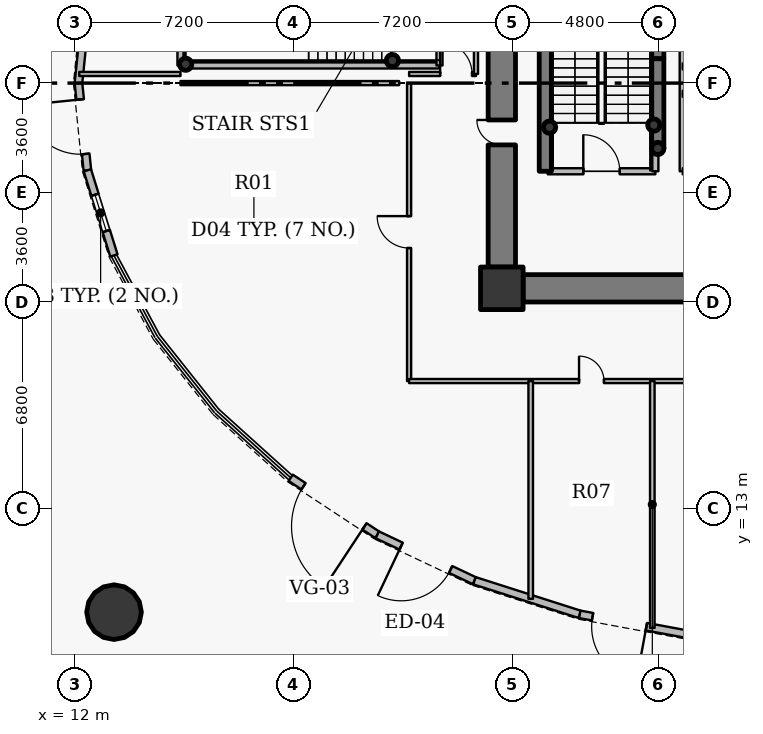
"""IFC4 building model, lengths in metres.
Left out: names, types, materials, properties, quantities, classifications, styles, units other than length and angle.
Written with IfcOpenShell. Run it as: python <this file> out.ifc"""

import sys

from ifc_helpers import new_model, si_unit, direction, frame, frame_2d, origin, origin_2d, place, context, subcontext, project, spatial, rectangle, hollow_circle, extrude, source, transform, mapped, element, fill, save


model = new_model("IFC4")
c1 = context("Model", 3, precision=1e-05, world=origin(), true_north=direction((0.0, 1.0)))
c2 = subcontext(c1, "Body", "Model", "MODEL_VIEW")
j1 = project(units=[si_unit("LENGTHUNIT", "METRE"), si_unit("PLANEANGLEUNIT", "RADIAN")], contexts=[c1])
p1 = place(None, origin())
s1 = spatial("IfcSite", under=j1, at=p1, CompositionType="ELEMENT")
p2 = place(p1, origin())
s2 = spatial("IfcBuilding", under=s1, at=p2, CompositionType="ELEMENT")
p3 = place(p2, origin())
s3 = spatial("IfcBuildingStorey", under=s2, at=p3, CompositionType="ELEMENT", Elevation=0.0)
p4 = place(p3, frame((26.05, 20.25, 0.0), z_axis=(0.0, 0.0, 1.0), x_axis=(1.0, 0.0, 0.0)))
e1 = element("IfcColumn", 1, at=p4, inside=s3, PredefinedType="COLUMN", context=c2, shape_type="SweptSolid", body=[
    extrude(rectangle(XDim=1.4, YDim=1.4, at=origin_2d()), origin(), (0.0, 0.0, 1.0), 6.0),
])
p5 = place(p3, frame((27.48, 24.1, 0.0), z_axis=(0.0, 0.0, 1.0), x_axis=(0.0, 1.0, 0.0)))
e2 = element("IfcWall", 2, at=p5, inside=s3, PredefinedType="SHEAR", context=c2, shape_type="SweptSolid", body=[
    extrude(rectangle(XDim=8.6, YDim=0.4, at=frame_2d((4.3, 0.0))), origin(), (0.0, 0.0, 1.0), 6.0),
])
p6 = place(p3, frame((31.18, 27.8, 0.0), z_axis=(0.0, 0.0, 1.0), x_axis=(0.0, 1.0, 0.0)))
e3 = element("IfcWall", 3, at=p6, inside=s3, PredefinedType="SHEAR", context=c2, shape_type="SweptSolid", body=[
    extrude(rectangle(XDim=4.9, YDim=0.4, at=frame_2d((2.45, 0.0))), origin(), (0.0, 0.0, 1.0), 6.0),
])
for number, where, z_axis, x_axis in (
    (4, (31.05, 25.62, 0.0), (0.0, 0.0, 1.0), (1.0, 0.0, 0.0)),
    (5, (31.18, 24.85, 0.0), (0.0, 0.0, 1.0), (1.0, 0.0, 0.0)),
    (6, (27.62, 25.55, 0.0), (0.0, 0.0, 1.0), (1.0, 0.0, 0.0)),
    (7, (15.65, 27.62, 0.0), (0.0, 0.0, 1.0), (1.0, 0.0, 0.0)),
    (8, (22.45, 27.74, 0.0), (0.0, 0.0, 1.0), (1.0, 0.0, 0.0)),
):
    element("IfcColumn", number, at=place(p3, frame(where, z_axis=z_axis, x_axis=x_axis)), inside=s3, PredefinedType="COLUMN", context=c2, shape_type="SweptSolid", body=[
        extrude(hollow_circle(Radius=0.203, WallThickness=0.016, at=origin_2d()), origin(), (0.0, 0.0, 1.0), 6.0),
    ])
p7 = place(p3, frame((45.25, 20.25, 0.0), z_axis=(0.0, 0.0, 1.0), x_axis=(-1.0, 0.0, 0.0)))
e9 = element("IfcWall", 9, at=p7, inside=s3, PredefinedType="SHEAR", context=c2, shape_type="SweptSolid", body=[
    extrude(rectangle(XDim=18.5, YDim=0.9, at=frame_2d((9.25, 0.0))), origin(), (0.0, 0.0, 1.0), 5.15),
])
p8 = place(p7, frame((10.0, 0.0, 0.0)))
e10 = element("IfcOpeningElement", 10, at=p8, cuts=e9, PredefinedType="OPENING", context=c2, shape_type="SweptSolid", body=[
    extrude(rectangle(XDim=1.15, YDim=2.15, at=origin_2d()), frame((0.575, 0.46, 1.075), z_axis=(0.0, -1.0, 0.0), x_axis=(1.0, 0.0, 0.0)), (0.0, 0.0, 1.0), 0.92),
])
p9 = place(p3, frame((26.05, 20.95, 0.0), z_axis=(0.0, 0.0, 1.0), x_axis=(0.0, 1.0, 0.0)))
e11 = element("IfcWall", 11, at=p9, inside=s3, PredefinedType="SHEAR", context=c2, shape_type="SweptSolid", body=[
    extrude(rectangle(XDim=12.1, YDim=0.9, at=frame_2d((6.05, 0.0))), origin(), (0.0, 0.0, 1.0), 5.15),
])
p10 = place(p9, frame((4.017, 0.0, 0.0)))
e12 = element("IfcOpeningElement", 12, at=p10, cuts=e11, PredefinedType="OPENING", context=c2, shape_type="SweptSolid", body=[
    extrude(rectangle(XDim=0.82, YDim=2.1, at=origin_2d()), frame((0.41, 0.46, 1.05), z_axis=(0.0, -1.0, 0.0), x_axis=(1.0, 0.0, 0.0)), (0.0, 0.0, 1.0), 0.92),
])
p11 = place(p3, frame((31.18, 24.85, 0.0), z_axis=(0.0, 0.0, 1.0), x_axis=(0.0, 1.0, 0.0)))
e13 = element("IfcWall", 13, at=p11, inside=s3, PredefinedType="SHEAR", context=c2, shape_type="SweptSolid", body=[
    extrude(rectangle(XDim=2.95, YDim=0.4, at=frame_2d((1.475, 0.0))), origin(), (0.0, 0.0, 1.0), 5.3),
])
p12 = place(p3, frame((13.295, 9.599, 0.0), z_axis=(0.0, 0.0, 1.0), x_axis=(1.0, 0.0, 0.0)))
e14 = element("IfcColumn", 14, at=p12, inside=s3, PredefinedType="COLUMN", context=c2, shape_type="SweptSolid", body=[
    extrude(hollow_circle(Radius=0.9, WallThickness=0.05, at=origin_2d()), origin(), (0.0, 0.0, 1.0), 6.0),
])
p13 = place(p3, frame((12.125, 27.0, 0.0), z_axis=(0.0, 0.0, 1.0), x_axis=(0.10159063445, 0.994826287847, 0.0)))
e15 = element("IfcWall", 15, at=p13, inside=s3, PredefinedType="SOLIDWALL", context=c2, shape_type="SweptSolid", body=[
    extrude(rectangle(XDim=2.884, YDim=0.25, at=frame_2d((1.442, 0.0))), origin(), (0.0, 0.0, 1.0), 4.885),
])
p14 = place(p3, frame((12.418, 24.131, 0.0), z_axis=(0.0, 0.0, 1.0), x_axis=(-0.10159063445, 0.994826287847, 0.0)))
e16 = element("IfcWall", 16, at=p14, inside=s3, PredefinedType="SOLIDWALL", context=c2, shape_type="SweptSolid", body=[
    extrude(rectangle(XDim=2.884, YDim=0.25, at=frame_2d((1.442, 0.0))), origin(), (0.0, 0.0, 1.0), 4.885),
])
p15 = place(p14, frame((0.542, 0.0, 0.0)))
e17 = element("IfcOpeningElement", 17, at=p15, cuts=e16, PredefinedType="OPENING", context=c2, shape_type="SweptSolid", body=[
    extrude(rectangle(XDim=1.8, YDim=2.2, at=origin_2d()), frame((0.9, 0.135, 1.1), z_axis=(0.0, -1.0, 0.0), x_axis=(1.0, 0.0, 0.0)), (0.0, 0.0, 1.0), 0.27),
])
p16 = place(p3, frame((13.29, 21.332, 0.0), z_axis=(0.0, 0.0, 1.0), x_axis=(-0.297355038878, 0.954766977254, 0.0)))
e18 = element("IfcWall", 18, at=p16, inside=s3, PredefinedType="SOLIDWALL", context=c2, shape_type="SweptSolid", body=[
    extrude(rectangle(XDim=2.932, YDim=0.25, at=frame_2d((1.466, 0.0))), origin(), (0.0, 0.0, 1.0), 4.885),
])
p17 = place(p16, frame((0.841, 0.0, 0.9)))
e19 = element("IfcOpeningElement", 19, at=p17, cuts=e18, PredefinedType="OPENING", context=c2, shape_type="SweptSolid", body=[
    extrude(rectangle(XDim=1.25, YDim=1.65, at=origin_2d()), frame((0.625, 0.135, 0.825), z_axis=(0.0, -1.0, 0.0), x_axis=(1.0, 0.0, 0.0)), (0.0, 0.0, 1.0), 0.27),
])
p18 = place(p3, frame((21.954, 12.142, 0.0), z_axis=(0.0, 0.0, 1.0), x_axis=(-0.835263082911, 0.549850509071, 0.0)))
e20 = element("IfcWall", 20, at=p18, inside=s3, PredefinedType="SOLIDWALL", context=c2, shape_type="SweptSolid", body=[
    extrude(rectangle(XDim=3.41, YDim=0.25, at=frame_2d((1.705, 0.0))), origin(), (0.0, 0.0, 1.0), 4.885),
])
p19 = place(p18, frame((0.505, 0.0, 0.0)))
e21 = element("IfcOpeningElement", 21, at=p19, cuts=e20, PredefinedType="OPENING", context=c2, shape_type="SweptSolid", body=[
    extrude(rectangle(XDim=2.4, YDim=2.2, at=origin_2d()), frame((1.2, 0.135, 1.1), z_axis=(0.0, -1.0, 0.0), x_axis=(1.0, 0.0, 0.0)), (0.0, 0.0, 1.0), 0.27),
])
p20 = place(p3, frame((25.15, 10.633, 0.0), z_axis=(0.0, 0.0, 1.0), x_axis=(-0.9041930697, 0.427123978146, 0.0)))
e22 = element("IfcWall", 22, at=p20, inside=s3, PredefinedType="SOLIDWALL", context=c2, shape_type="SweptSolid", body=[
    extrude(rectangle(XDim=3.534, YDim=0.25, at=frame_2d((1.767, 0.0))), origin(), (0.0, 0.0, 1.0), 4.885),
])
p21 = place(p20, frame((0.867, 0.0, 0.0)))
e23 = element("IfcOpeningElement", 23, at=p21, cuts=e22, PredefinedType="OPENING", context=c2, shape_type="SweptSolid", body=[
    extrude(rectangle(XDim=1.8, YDim=2.2, at=origin_2d()), frame((0.9, 0.135, 1.1), z_axis=(0.0, -1.0, 0.0), x_axis=(1.0, 0.0, 0.0)), (0.0, 0.0, 1.0), 0.27),
])
p22 = place(p3, frame((28.614, 9.527, 0.0), z_axis=(0.0, 0.0, 1.0), x_axis=(-0.952608721119, 0.304198330777, 0.0)))
e24 = element("IfcWall", 24, at=p22, inside=s3, PredefinedType="SOLIDWALL", context=c2, shape_type="SweptSolid", body=[
    extrude(rectangle(XDim=3.636, YDim=0.25, at=frame_2d((1.818, 0.0))), origin(), (0.0, 0.0, 1.0), 4.885),
])
p23 = place(p3, frame((32.261, 8.852, 0.0), z_axis=(0.0, 0.0, 1.0), x_axis=(-0.983306878602, 0.181954891374, 0.0)))
e25 = element("IfcWall", 25, at=p23, inside=s3, PredefinedType="SOLIDWALL", context=c2, shape_type="SweptSolid", body=[
    extrude(rectangle(XDim=3.709, YDim=0.25, at=frame_2d((1.854, 0.0))), origin(), (0.0, 0.0, 1.0), 5.7),
])
p24 = place(p23, frame((1.481, 0.0, 0.0)))
e26 = element("IfcOpeningElement", 26, at=p24, cuts=e25, PredefinedType="OPENING", context=c2, shape_type="SweptSolid", body=[
    extrude(rectangle(XDim=1.8, YDim=2.2, at=origin_2d()), frame((0.9, 0.135, 1.1), z_axis=(0.0, -1.0, 0.0), x_axis=(1.0, 0.0, 0.0)), (0.0, 0.0, 1.0), 0.27),
])
p25 = place(p3, frame((15.48, 27.58, 0.0), z_axis=(0.0, 0.0, 1.0), x_axis=(0.0, 1.0, 0.0)))
e27 = element("IfcWall", 27, at=p25, inside=s3, PredefinedType="PARTITIONING", context=c2, shape_type="SweptSolid", body=[
    extrude(rectangle(XDim=3.54, YDim=0.2, at=frame_2d((1.77, 0.0))), origin(), (0.0, 0.0, 1.0), 5.7),
])
p26 = place(p3, frame((15.48, 27.58, 0.0), z_axis=(0.0, 0.0, 1.0), x_axis=(1.0, 0.0, 0.0)))
e28 = element("IfcWall", 28, at=p26, inside=s3, PredefinedType="PARTITIONING", context=c2, shape_type="SweptSolid", body=[
    extrude(rectangle(XDim=8.52, YDim=0.2, at=frame_2d((4.26, 0.0))), origin(), (0.0, 0.0, 1.0), 5.7),
])
p27 = place(p3, frame((23.0, 17.2, 0.0), z_axis=(0.0, 0.0, 1.0), x_axis=(0.0, 1.0, 0.0)))
e29 = element("IfcWall", 29, at=p27, inside=s3, PredefinedType="PARTITIONING", context=c2, shape_type="SweptSolid", body=[
    extrude(rectangle(XDim=9.8, YDim=0.135, at=frame_2d((4.9, 0.0))), origin(), (0.0, 0.0, 1.0), 4.885),
])
p28 = place(p27, frame((4.375, 0.0, 0.0)))
e30 = element("IfcOpeningElement", 30, at=p28, cuts=e29, PredefinedType="OPENING", context=c2, shape_type="SweptSolid", body=[
    extrude(rectangle(XDim=1.05, YDim=2.15, at=origin_2d()), frame((0.525, 0.078, 1.075), z_axis=(0.0, -1.0, 0.0), x_axis=(1.0, 0.0, 0.0)), (0.0, 0.0, 1.0), 0.155),
])
p29 = place(p3, frame((23.0, 17.2, 0.0), z_axis=(0.0, 0.0, 1.0), x_axis=(1.0, 0.0, 0.0)))
e31 = element("IfcWall", 31, at=p29, inside=s3, PredefinedType="PARTITIONING", context=c2, shape_type="SweptSolid", body=[
    extrude(rectangle(XDim=11.2, YDim=0.135, at=frame_2d((5.6, 0.0))), origin(), (0.0, 0.0, 1.0), 4.885),
])
p30 = place(p29, frame((5.59, 0.0, 0.0)))
e32 = element("IfcOpeningElement", 32, at=p30, cuts=e31, PredefinedType="OPENING", context=c2, shape_type="SweptSolid", body=[
    extrude(rectangle(XDim=0.82, YDim=2.1, at=origin_2d()), frame((0.41, 0.078, 1.05), z_axis=(0.0, -1.0, 0.0), x_axis=(1.0, 0.0, 0.0)), (0.0, 0.0, 1.0), 0.155),
])
p31 = place(p3, frame((23.0, 27.3, 0.0), z_axis=(0.0, 0.0, 1.0), x_axis=(1.0, 0.0, 0.0)))
e33 = element("IfcWall", 33, at=p31, inside=s3, PredefinedType="PARTITIONING", context=c2, shape_type="SweptSolid", body=[
    extrude(rectangle(XDim=2.2, YDim=0.135, at=frame_2d((1.1, 0.0))), origin(), (0.0, 0.0, 1.0), 5.7),
])
p32 = place(p31, frame((1.021, 0.0, 0.0)))
e34 = element("IfcOpeningElement", 34, at=p32, cuts=e33, PredefinedType="OPENING", context=c2, shape_type="SweptSolid", body=[
    extrude(rectangle(XDim=1.05, YDim=2.15, at=origin_2d()), frame((0.525, 0.078, 1.075), z_axis=(0.0, -1.0, 0.0), x_axis=(1.0, 0.0, 0.0)), (0.0, 0.0, 1.0), 0.155),
])
p33 = place(p3, frame((24.0, 27.58, 0.0), z_axis=(0.0, 0.0, 1.0), x_axis=(0.0, 1.0, 0.0)))
e35 = element("IfcWall", 35, at=p33, inside=s3, PredefinedType="PARTITIONING", context=c2, shape_type="SweptSolid", body=[
    extrude(rectangle(XDim=3.54, YDim=0.2, at=frame_2d((1.77, 0.0))), origin(), (0.0, 0.0, 1.0), 5.7),
])
p34 = place(p3, frame((25.2, 27.3, 0.0), z_axis=(0.0, 0.0, 1.0), x_axis=(0.0, 1.0, 0.0)))
e36 = element("IfcWall", 36, at=p34, inside=s3, PredefinedType="PARTITIONING", context=c2, shape_type="SweptSolid", body=[
    extrude(rectangle(XDim=3.9, YDim=0.135, at=frame_2d((1.95, 0.0))), origin(), (0.0, 0.0, 1.0), 4.885),
])
p35 = place(p3, frame((27.0, 10.037, 0.0), z_axis=(0.0, 0.0, 1.0), x_axis=(0.0, 1.0, 0.0)))
e37 = element("IfcWall", 37, at=p35, inside=s3, PredefinedType="PARTITIONING", context=c2, shape_type="SweptSolid", body=[
    extrude(rectangle(XDim=7.163, YDim=0.15, at=frame_2d((3.582, 0.0))), origin(), (0.0, 0.0, 1.0), 4.885),
])
p36 = place(p3, frame((27.56, 24.1, 0.0), z_axis=(0.0, 0.0, 1.0), x_axis=(1.0, 0.0, 0.0)))
e38 = element("IfcWall", 38, at=p36, inside=s3, PredefinedType="PARTITIONING", context=c2, shape_type="SweptSolid", body=[
    extrude(rectangle(XDim=3.54, YDim=0.2, at=frame_2d((1.77, 0.0))), origin(), (0.0, 0.0, 1.0), 5.7),
])
p37 = place(p36, frame((1.17, 0.0, 0.0)))
e39 = element("IfcOpeningElement", 39, at=p37, cuts=e38, PredefinedType="OPENING", context=c2, shape_type="SweptSolid", body=[
    extrude(rectangle(XDim=1.2, YDim=2.15, at=origin_2d()), frame((0.6, 0.11, 1.075), z_axis=(0.0, -1.0, 0.0), x_axis=(1.0, 0.0, 0.0)), (0.0, 0.0, 1.0), 0.22),
])
p38 = place(p3, frame((31.0, 9.08, 0.0), z_axis=(0.0, 0.0, 1.0), x_axis=(0.0, 1.0, 0.0)))
e40 = element("IfcWall", 40, at=p38, inside=s3, PredefinedType="PARTITIONING", context=c2, shape_type="SweptSolid", body=[
    extrude(rectangle(XDim=8.12, YDim=0.15, at=frame_2d((4.06, 0.0))), origin(), (0.0, 0.0, 1.0), 5.7),
])
p39 = place(p3, frame((31.1, 24.1, 0.0), z_axis=(0.0, 0.0, 1.0), x_axis=(0.0, 1.0, 0.0)))
e41 = element("IfcWall", 41, at=p39, inside=s3, PredefinedType="PARTITIONING", context=c2, shape_type="SweptSolid", body=[
    extrude(rectangle(XDim=0.74, YDim=0.2, at=frame_2d((0.37, 0.0))), origin(), (0.0, 0.0, 1.0), 5.7),
])
p40 = place(p3, frame((32.0, 24.1, 0.0), z_axis=(0.0, 0.0, 1.0), x_axis=(0.0, 1.0, 0.0)))
e42 = element("IfcWall", 42, at=p40, inside=s3, PredefinedType="PARTITIONING", context=c2, shape_type="SweptSolid", body=[
    extrude(rectangle(XDim=8.0, YDim=0.2, at=frame_2d((4.0, 0.0))), origin(), (0.0, 0.0, 1.0), 5.7),
])
p41 = place(p3, frame((15.48, 27.3, 0.0), z_axis=(0.0, 0.0, 1.0), x_axis=(-1.0, 0.0, 0.0)))
e43 = element("IfcWall", 43, at=p41, inside=s3, PredefinedType="PARTITIONING", context=c2, shape_type="SweptSolid", body=[
    extrude(rectangle(XDim=3.329, YDim=0.135, at=frame_2d((1.665, 0.0))), origin(), (0.0, 0.0, 1.0), 5.7),
])
p42 = place(p3, frame((25.6, 20.94, 0.0), z_axis=(0.0, 0.0, 1.0), x_axis=(0.0, -1.0, 0.0)))
e44 = element("IfcWall", 44, at=p42, inside=s3, PredefinedType="PARTITIONING", context=c2, shape_type="SweptSolid", body=[
    extrude(rectangle(XDim=1.14, YDim=0.135, at=frame_2d((0.57, 0.0))), origin(), (0.0, 0.0, 1.0), 5.7),
])
p43 = place(p3, frame((25.907, 19.8, 0.0), z_axis=(0.0, 0.0, 1.0), x_axis=(1.0, 0.0, 0.0)))
e45 = element("IfcWall", 45, at=p43, inside=s3, PredefinedType="PARTITIONING", context=c2, shape_type="SweptSolid", body=[
    extrude(rectangle(XDim=0.833, YDim=0.135, at=frame_2d((0.416, 0.0))), origin(), (0.0, 0.0, 1.0), 4.885),
])
p44 = place(p3, frame((15.48, 27.0, 0.0), z_axis=(0.0, 0.0, 1.0), x_axis=(1.0, 0.0, 0.0)))
e46 = element("IfcWall", 46, at=p44, inside=s3, PredefinedType="PARTITIONING", context=c2, shape_type="SweptSolid", body=[
    extrude(rectangle(XDim=7.193, YDim=0.135, at=frame_2d((3.596, 0.0))), origin(), (0.0, 0.0, 1.0), 4.885),
])
m1 = source(origin(), c2, "Body", "SweptSolid", [
    extrude(rectangle(XDim=1.8, YDim=2.2, at=origin_2d()), frame((0.9, 0.025, 1.1), z_axis=(0.0, -1.0, 0.0), x_axis=(1.0, 0.0, 0.0)), (0.0, 0.0, 1.0), 0.05),
])
p45 = place(p15, origin())
e47 = element("IfcDoor", 47, at=p45, inside=s3, OperationType="SINGLE_SWING_RIGHT", PredefinedType="DOOR", context=c2, shape_type="MappedRepresentation", body=[
    mapped(m1, transform((0.0, 0.0, 0.0), x_axis=(1.0, 0.0, 0.0), y_axis=(0.0, 1.0, 0.0), z_axis=(0.0, 0.0, 1.0), scale=1.0)),
])
fill(e17, e47)
m2 = source(origin(), c2, "Body", "SweptSolid", [
    extrude(rectangle(XDim=1.25, YDim=1.65, at=origin_2d()), frame((0.625, 0.03, 0.825), z_axis=(0.0, -1.0, 0.0), x_axis=(1.0, 0.0, 0.0)), (0.0, 0.0, 1.0), 0.06),
])
p46 = place(p17, origin())
e48 = element("IfcWindow", 48, at=p46, inside=s3, PartitioningType="SINGLE_PANEL", PredefinedType="WINDOW", context=c2, shape_type="MappedRepresentation", body=[
    mapped(m2, transform((0.0, 0.0, 0.0), x_axis=(1.0, 0.0, 0.0), y_axis=(0.0, 1.0, 0.0), z_axis=(0.0, 0.0, 1.0), scale=1.0)),
])
fill(e19, e48)
m3 = source(origin(), c2, "Body", "SweptSolid", [
    extrude(rectangle(XDim=2.4, YDim=2.2, at=origin_2d()), frame((1.2, 0.025, 1.1), z_axis=(0.0, -1.0, 0.0), x_axis=(1.0, 0.0, 0.0)), (0.0, 0.0, 1.0), 0.05),
])
p47 = place(p19, origin())
e49 = element("IfcDoor", 49, at=p47, inside=s3, OperationType="SINGLE_SWING_LEFT", PredefinedType="GATE", context=c2, shape_type="MappedRepresentation", body=[
    mapped(m3, transform((0.0, 0.0, 0.0), x_axis=(1.0, 0.0, 0.0), y_axis=(0.0, 1.0, 0.0), z_axis=(0.0, 0.0, 1.0), scale=1.0)),
])
fill(e21, e49)
p48 = place(p21, origin())
e50 = element("IfcDoor", 50, at=p48, inside=s3, OperationType="SINGLE_SWING_RIGHT", PredefinedType="DOOR", context=c2, shape_type="MappedRepresentation", body=[
    mapped(m1, transform((0.0, 0.0, 0.0), x_axis=(1.0, 0.0, 0.0), y_axis=(0.0, 1.0, 0.0), z_axis=(0.0, 0.0, 1.0), scale=1.0)),
])
fill(e23, e50)
p49 = place(p24, origin())
e51 = element("IfcDoor", 51, at=p49, inside=s3, OperationType="SINGLE_SWING_LEFT", PredefinedType="DOOR", context=c2, shape_type="MappedRepresentation", body=[
    mapped(m1, transform((0.0, 0.0, 0.0), x_axis=(1.0, 0.0, 0.0), y_axis=(0.0, 1.0, 0.0), z_axis=(0.0, 0.0, 1.0), scale=1.0)),
])
fill(e26, e51)
m4 = source(origin(), c2, "Body", "SweptSolid", [
    extrude(rectangle(XDim=0.82, YDim=2.1, at=origin_2d()), frame((0.41, 0.025, 1.05), z_axis=(0.0, -1.0, 0.0), x_axis=(1.0, 0.0, 0.0)), (0.0, 0.0, 1.0), 0.05),
])
p50 = place(p10, origin())
e52 = element("IfcDoor", 52, at=p50, inside=s3, OperationType="SINGLE_SWING_RIGHT", PredefinedType="DOOR", context=c2, shape_type="MappedRepresentation", body=[
    mapped(m4, transform((0.0, 0.0, 0.0), x_axis=(1.0, 0.0, 0.0), y_axis=(0.0, 1.0, 0.0), z_axis=(0.0, 0.0, 1.0), scale=1.0)),
])
fill(e12, e52)
m5 = source(origin(), c2, "Body", "SweptSolid", [
    extrude(rectangle(XDim=1.2, YDim=2.15, at=origin_2d()), frame((0.6, 0.025, 1.075), z_axis=(0.0, -1.0, 0.0), x_axis=(1.0, 0.0, 0.0)), (0.0, 0.0, 1.0), 0.05),
])
p51 = place(p37, origin())
e53 = element("IfcDoor", 53, at=p51, inside=s3, OperationType="SINGLE_SWING_LEFT", PredefinedType="DOOR", context=c2, shape_type="MappedRepresentation", body=[
    mapped(m5, transform((0.0, 0.0, 0.0), x_axis=(1.0, 0.0, 0.0), y_axis=(0.0, 1.0, 0.0), z_axis=(0.0, 0.0, 1.0), scale=1.0)),
])
fill(e39, e53)
m6 = source(origin(), c2, "Body", "SweptSolid", [
    extrude(rectangle(XDim=1.05, YDim=2.15, at=origin_2d()), frame((0.525, 0.025, 1.075), z_axis=(0.0, -1.0, 0.0), x_axis=(1.0, 0.0, 0.0)), (0.0, 0.0, 1.0), 0.05),
])
p52 = place(p32, origin())
e54 = element("IfcDoor", 54, at=p52, inside=s3, OperationType="SINGLE_SWING_LEFT", PredefinedType="DOOR", context=c2, shape_type="MappedRepresentation", body=[
    mapped(m6, transform((0.0, 0.0, 0.0), x_axis=(1.0, 0.0, 0.0), y_axis=(0.0, 1.0, 0.0), z_axis=(0.0, 0.0, 1.0), scale=1.0)),
])
fill(e34, e54)
p53 = place(p28, origin())
e55 = element("IfcDoor", 55, at=p53, inside=s3, OperationType="SINGLE_SWING_RIGHT", PredefinedType="DOOR", context=c2, shape_type="MappedRepresentation", body=[
    mapped(m6, transform((0.0, 0.0, 0.0), x_axis=(1.0, 0.0, 0.0), y_axis=(0.0, 1.0, 0.0), z_axis=(0.0, 0.0, 1.0), scale=1.0)),
])
fill(e30, e55)
p54 = place(p30, origin())
e56 = element("IfcDoor", 56, at=p54, inside=s3, OperationType="SINGLE_SWING_LEFT", PredefinedType="DOOR", context=c2, shape_type="MappedRepresentation", body=[
    mapped(m4, transform((0.0, 0.0, 0.0), x_axis=(1.0, 0.0, 0.0), y_axis=(0.0, 1.0, 0.0), z_axis=(0.0, 0.0, 1.0), scale=1.0)),
])
fill(e32, e56)
save(model, sys.argv[1])
